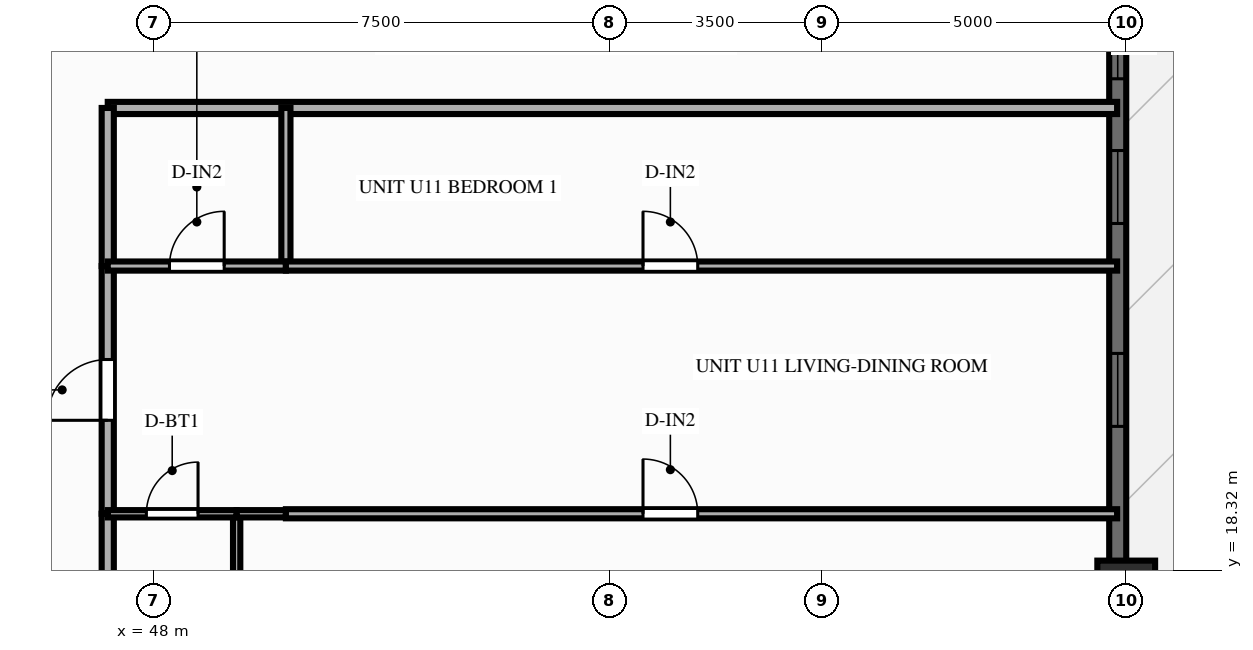
"""IFC4 building model, lengths in metres.
Left out: names, types, materials, properties, quantities, classifications, styles, units other than length and angle.
Written with IfcOpenShell. Run it as: python <this file> out.ifc"""

import sys

from ifc_helpers import new_model, si_unit, direction, frame, frame_2d, origin, origin_2d, place, context, subcontext, project, spatial, rectangle, extrude, source, transform, mapped, element, fill, save


model = new_model("IFC4")
c1 = context("Model", 3, precision=1e-05, world=origin(), true_north=direction((0.0, 1.0)))
c2 = subcontext(c1, "Body", "Model", "MODEL_VIEW")
j1 = project(units=[si_unit("LENGTHUNIT", "METRE"), si_unit("PLANEANGLEUNIT", "RADIAN")], contexts=[c1])
p1 = place(None, origin())
s1 = spatial("IfcSite", under=j1, at=p1, CompositionType="ELEMENT")
p2 = place(p1, origin())
s2 = spatial("IfcBuilding", under=s1, at=p2, CompositionType="ELEMENT")
p3 = place(p2, frame((0.0, 0.0, 104.85)))
s3 = spatial("IfcBuildingStorey", under=s2, at=p3, CompositionType="ELEMENT", Elevation=104.85)
m1 = source(origin(), c2, "Body", "SweptSolid", [
    extrude(rectangle(XDim=0.95, YDim=0.95, at=origin_2d()), origin(), (0.0, 0.0, 1.0), 3.0),
])
p4 = place(p3, frame((64.0, 18.0, 0.0), z_axis=(0.0, 0.0, 1.0), x_axis=(1.0, 0.0, 0.0)))
e1 = element("IfcColumn", 1, at=p4, inside=s3, PredefinedType="COLUMN", context=c2, shape_type="MappedRepresentation", body=[
    mapped(m1, transform((0.0, 0.0, 0.0), scale=1.0)),
])
p5 = place(p3, frame((63.86, 7.2, 0.0), z_axis=(0.0, 0.0, 1.0), x_axis=(0.0, 1.0, 0.0)))
e2 = element("IfcWall", 2, at=p5, inside=s3, PredefinedType="SOLIDWALL", context=c2, shape_type="SweptSolid", body=[
    extrude(rectangle(XDim=39.6, YDim=0.28, at=frame_2d((19.8, 0.0))), origin(), (0.0, 0.0, 1.0), 2.28),
])
p6 = place(p5, frame((0.945, 0.0, 0.25)))
e3 = element("IfcOpeningElement", 3, at=p6, cuts=e2, PredefinedType="OPENING", context=c2, shape_type="SweptSolid", body=[
    extrude(rectangle(XDim=1.2, YDim=1.5, at=frame_2d((0.6, 0.75))), frame((0.0, 0.152, 0.0), z_axis=(0.0, -1.0, 0.0), x_axis=(1.0, 0.0, 0.0)), (0.0, 0.0, 1.0), 0.304),
])
p7 = place(p5, frame((4.213, 0.0, 0.25)))
e4 = element("IfcOpeningElement", 4, at=p7, cuts=e2, PredefinedType="OPENING", context=c2, shape_type="SweptSolid", body=[
    extrude(rectangle(XDim=1.2, YDim=1.5, at=frame_2d((0.6, 0.75))), frame((0.0, 0.152, 0.0), z_axis=(0.0, -1.0, 0.0), x_axis=(1.0, 0.0, 0.0)), (0.0, 0.0, 1.0), 0.304),
])
p8 = place(p5, frame((7.55, 0.0, 0.25)))
e5 = element("IfcOpeningElement", 5, at=p8, cuts=e2, PredefinedType="OPENING", context=c2, shape_type="SweptSolid", body=[
    extrude(rectangle(XDim=1.2, YDim=1.5, at=frame_2d((0.6, 0.75))), frame((0.0, 0.152, 0.0), z_axis=(0.0, -1.0, 0.0), x_axis=(1.0, 0.0, 0.0)), (0.0, 0.0, 1.0), 0.304),
])
p9 = place(p5, frame((13.483, 0.0, 0.25)))
e6 = element("IfcOpeningElement", 6, at=p9, cuts=e2, PredefinedType="OPENING", context=c2, shape_type="SweptSolid", body=[
    extrude(rectangle(XDim=1.2, YDim=1.5, at=frame_2d((0.6, 0.75))), frame((0.0, 0.152, 0.0), z_axis=(0.0, -1.0, 0.0), x_axis=(1.0, 0.0, 0.0)), (0.0, 0.0, 1.0), 0.304),
])
p10 = place(p5, frame((16.82, 0.0, 0.25)))
e7 = element("IfcOpeningElement", 7, at=p10, cuts=e2, PredefinedType="OPENING", context=c2, shape_type="SweptSolid", body=[
    extrude(rectangle(XDim=1.2, YDim=1.5, at=frame_2d((0.6, 0.75))), frame((0.0, 0.152, 0.0), z_axis=(0.0, -1.0, 0.0), x_axis=(1.0, 0.0, 0.0)), (0.0, 0.0, 1.0), 0.304),
])
p11 = place(p5, frame((19.2, 0.0, 0.25)))
e8 = element("IfcOpeningElement", 8, at=p11, cuts=e2, PredefinedType="OPENING", context=c2, shape_type="SweptSolid", body=[
    extrude(rectangle(XDim=1.2, YDim=1.5, at=frame_2d((0.6, 0.75))), frame((0.0, 0.152, 0.0), z_axis=(0.0, -1.0, 0.0), x_axis=(1.0, 0.0, 0.0)), (0.0, 0.0, 1.0), 0.304),
])
p12 = place(p5, frame((21.578, 0.0, 0.25)))
e9 = element("IfcOpeningElement", 9, at=p12, cuts=e2, PredefinedType="OPENING", context=c2, shape_type="SweptSolid", body=[
    extrude(rectangle(XDim=1.2, YDim=1.5, at=frame_2d((0.6, 0.75))), frame((0.0, 0.152, 0.0), z_axis=(0.0, -1.0, 0.0), x_axis=(1.0, 0.0, 0.0)), (0.0, 0.0, 1.0), 0.304),
])
p13 = place(p5, frame((26.313, 0.0, 0.0), z_axis=(0.0, 0.0, 1.0), x_axis=(-1.0, 0.0, 0.0)))
e10 = element("IfcOpeningElement", 10, at=p13, cuts=e2, PredefinedType="OPENING", context=c2, shape_type="SweptSolid", body=[
    extrude(rectangle(XDim=1.6, YDim=2.15, at=frame_2d((0.8, 1.075))), frame((0.0, 0.152, 0.0), z_axis=(0.0, -1.0, 0.0), x_axis=(1.0, 0.0, 0.0)), (0.0, 0.0, 1.0), 0.304),
])
p14 = place(p5, frame((29.305, 0.0, 0.25)))
e11 = element("IfcOpeningElement", 11, at=p14, cuts=e2, PredefinedType="OPENING", context=c2, shape_type="SweptSolid", body=[
    extrude(rectangle(XDim=0.7, YDim=1.5, at=frame_2d((0.35, 0.75))), frame((0.0, 0.152, 0.0), z_axis=(0.0, -1.0, 0.0), x_axis=(1.0, 0.0, 0.0)), (0.0, 0.0, 1.0), 0.304),
])
p15 = place(p5, frame((30.848, 0.0, 0.25)))
e12 = element("IfcOpeningElement", 12, at=p15, cuts=e2, PredefinedType="OPENING", context=c2, shape_type="SweptSolid", body=[
    extrude(rectangle(XDim=1.2, YDim=1.5, at=frame_2d((0.6, 0.75))), frame((0.0, 0.152, 0.0), z_axis=(0.0, -1.0, 0.0), x_axis=(1.0, 0.0, 0.0)), (0.0, 0.0, 1.0), 0.304),
])
p16 = place(p5, frame((34.183, 0.0, 0.25)))
e13 = element("IfcOpeningElement", 13, at=p16, cuts=e2, PredefinedType="OPENING", context=c2, shape_type="SweptSolid", body=[
    extrude(rectangle(XDim=1.2, YDim=1.5, at=frame_2d((0.6, 0.75))), frame((0.0, 0.152, 0.0), z_axis=(0.0, -1.0, 0.0), x_axis=(1.0, 0.0, 0.0)), (0.0, 0.0, 1.0), 0.304),
])
p17 = place(p5, frame((37.452, 0.0, 0.25)))
e14 = element("IfcOpeningElement", 14, at=p17, cuts=e2, PredefinedType="OPENING", context=c2, shape_type="SweptSolid", body=[
    extrude(rectangle(XDim=1.2, YDim=1.5, at=frame_2d((0.6, 0.75))), frame((0.0, 0.152, 0.0), z_axis=(0.0, -1.0, 0.0), x_axis=(1.0, 0.0, 0.0)), (0.0, 0.0, 1.0), 0.304),
])
p18 = place(p3, frame((47.25, 25.92, 0.0), z_axis=(0.0, 0.0, 1.0), x_axis=(1.0, 0.0, 0.0)))
e15 = element("IfcWall", 15, at=p18, inside=s3, PredefinedType="PARTITIONING", context=c2, shape_type="SweptSolid", body=[
    extrude(rectangle(XDim=16.6, YDim=0.2, at=frame_2d((8.3, 0.0))), origin(), (0.0, 0.0, 1.0), 2.79),
])
p19 = place(p3, frame((47.25, 16.65, 0.0), z_axis=(0.0, 0.0, 1.0), x_axis=(0.0, 1.0, 0.0)))
e16 = element("IfcWall", 16, at=p19, inside=s3, PredefinedType="PARTITIONING", context=c2, shape_type="SweptSolid", body=[
    extrude(rectangle(XDim=2.596, YDim=0.2, at=frame_2d((1.298, 0.0))), origin(), (0.0, 0.0, 1.0), 2.79),
])
p20 = place(p3, frame((47.25, 19.246, 0.0), z_axis=(0.0, 0.0, 1.0), x_axis=(0.0, 1.0, 0.0)))
e17 = element("IfcWall", 17, at=p20, inside=s3, PredefinedType="PARTITIONING", context=c2, shape_type="SweptSolid", body=[
    extrude(rectangle(XDim=4.074, YDim=0.2, at=frame_2d((2.037, 0.0))), origin(), (0.0, 0.0, 1.0), 2.79),
])
p21 = place(p20, frame((1.537, 0.0, 0.0)))
e18 = element("IfcOpeningElement", 18, at=p21, cuts=e17, PredefinedType="OPENING", context=c2, shape_type="SweptSolid", body=[
    extrude(rectangle(XDim=1.0, YDim=2.15, at=frame_2d((0.5, 1.075))), frame((0.0, 0.112, 0.0), z_axis=(0.0, -1.0, 0.0), x_axis=(1.0, 0.0, 0.0)), (0.0, 0.0, 1.0), 0.224),
])
p22 = place(p3, frame((47.25, 23.32, 0.0), z_axis=(0.0, 0.0, 1.0), x_axis=(0.0, 1.0, 0.0)))
e19 = element("IfcWall", 19, at=p22, inside=s3, PredefinedType="PARTITIONING", context=c2, shape_type="SweptSolid", body=[
    extrude(rectangle(XDim=2.6, YDim=0.2, at=frame_2d((1.3, 0.0))), origin(), (0.0, 0.0, 1.0), 2.79),
])
p23 = place(p3, frame((49.37, 16.65, 0.0), z_axis=(0.0, 0.0, 1.0), x_axis=(0.0, 1.0, 0.0)))
e20 = element("IfcWall", 20, at=p23, inside=s3, PredefinedType="PARTITIONING", context=c2, shape_type="SweptSolid", body=[
    extrude(rectangle(XDim=2.596, YDim=0.12, at=frame_2d((1.298, 0.0))), origin(), (0.0, 0.0, 1.0), 2.79),
])
p24 = place(p3, frame((50.18, 23.32, 0.0), z_axis=(0.0, 0.0, 1.0), x_axis=(0.0, 1.0, 0.0)))
e21 = element("IfcWall", 21, at=p24, inside=s3, PredefinedType="PARTITIONING", context=c2, shape_type="SweptSolid", body=[
    extrude(rectangle(XDim=2.6, YDim=0.15, at=frame_2d((1.3, 0.0))), origin(), (0.0, 0.0, 1.0), 2.79),
])
p25 = place(p3, frame((47.25, 19.246, 0.0), z_axis=(0.0, 0.0, 1.0), x_axis=(1.0, 0.0, 0.0)))
e22 = element("IfcWall", 22, at=p25, inside=s3, PredefinedType="PARTITIONING", context=c2, shape_type="SweptSolid", body=[
    extrude(rectangle(XDim=2.12, YDim=0.12, at=frame_2d((1.06, 0.0))), origin(), (0.0, 0.0, 1.0), 2.79),
])
p26 = place(p25, frame((0.635, 0.0, 0.0)))
e23 = element("IfcOpeningElement", 23, at=p26, cuts=e22, PredefinedType="OPENING", context=c2, shape_type="SweptSolid", body=[
    extrude(rectangle(XDim=0.85, YDim=2.05, at=frame_2d((0.425, 1.025))), frame((0.0, 0.072, 0.0), z_axis=(0.0, -1.0, 0.0), x_axis=(1.0, 0.0, 0.0)), (0.0, 0.0, 1.0), 0.144),
])
p27 = place(p3, frame((49.37, 19.246, 0.0), z_axis=(0.0, 0.0, 1.0), x_axis=(1.0, 0.0, 0.0)))
e24 = element("IfcWall", 24, at=p27, inside=s3, PredefinedType="PARTITIONING", context=c2, shape_type="SweptSolid", body=[
    extrude(rectangle(XDim=0.81, YDim=0.12, at=frame_2d((0.405, 0.0))), origin(), (0.0, 0.0, 1.0), 2.79),
])
p28 = place(p3, frame((50.18, 19.246, 0.0), z_axis=(0.0, 0.0, 1.0), x_axis=(1.0, 0.0, 0.0)))
e25 = element("IfcWall", 25, at=p28, inside=s3, PredefinedType="PARTITIONING", context=c2, shape_type="SweptSolid", body=[
    extrude(rectangle(XDim=13.67, YDim=0.15, at=frame_2d((6.835, 0.0))), origin(), (0.0, 0.0, 1.0), 2.79),
])
p29 = place(p28, frame((5.873, 0.0, 0.0)))
e26 = element("IfcOpeningElement", 26, at=p29, cuts=e25, PredefinedType="OPENING", context=c2, shape_type="SweptSolid", body=[
    extrude(rectangle(XDim=0.9, YDim=2.1, at=frame_2d((0.45, 1.05))), frame((0.0, 0.087, 0.0), z_axis=(0.0, -1.0, 0.0), x_axis=(1.0, 0.0, 0.0)), (0.0, 0.0, 1.0), 0.174),
])
p30 = place(p3, frame((47.25, 23.32, 0.0), z_axis=(0.0, 0.0, 1.0), x_axis=(1.0, 0.0, 0.0)))
e27 = element("IfcWall", 27, at=p30, inside=s3, PredefinedType="PARTITIONING", context=c2, shape_type="SweptSolid", body=[
    extrude(rectangle(XDim=2.93, YDim=0.15, at=frame_2d((1.465, 0.0))), origin(), (0.0, 0.0, 1.0), 2.79),
])
p31 = place(p30, frame((1.015, 0.0, 0.0)))
e28 = element("IfcOpeningElement", 28, at=p31, cuts=e27, PredefinedType="OPENING", context=c2, shape_type="SweptSolid", body=[
    extrude(rectangle(XDim=0.9, YDim=2.1, at=frame_2d((0.45, 1.05))), frame((0.0, 0.087, 0.0), z_axis=(0.0, -1.0, 0.0), x_axis=(1.0, 0.0, 0.0)), (0.0, 0.0, 1.0), 0.174),
])
p32 = place(p3, frame((50.18, 23.32, 0.0), z_axis=(0.0, 0.0, 1.0), x_axis=(1.0, 0.0, 0.0)))
e29 = element("IfcWall", 29, at=p32, inside=s3, PredefinedType="PARTITIONING", context=c2, shape_type="SweptSolid", body=[
    extrude(rectangle(XDim=13.67, YDim=0.15, at=frame_2d((6.835, 0.0))), origin(), (0.0, 0.0, 1.0), 2.79),
])
p33 = place(p32, frame((5.873, 0.0, 0.0)))
e30 = element("IfcOpeningElement", 30, at=p33, cuts=e29, PredefinedType="OPENING", context=c2, shape_type="SweptSolid", body=[
    extrude(rectangle(XDim=0.9, YDim=2.1, at=frame_2d((0.45, 1.05))), frame((0.0, 0.087, 0.0), z_axis=(0.0, -1.0, 0.0), x_axis=(1.0, 0.0, 0.0)), (0.0, 0.0, 1.0), 0.174),
])
m2 = source(origin(), c2, "Body", "SweptSolid", [
    extrude(rectangle(XDim=1.2, YDim=1.5, at=frame_2d((0.6, 0.75))), frame((0.0, 0.03, 0.0), z_axis=(0.0, -1.0, 0.0), x_axis=(1.0, 0.0, 0.0)), (0.0, 0.0, 1.0), 0.06),
])
p34 = place(p9, origin())
e31 = element("IfcWindow", 31, at=p34, inside=s3, PartitioningType="SINGLE_PANEL", PredefinedType="WINDOW", context=c2, shape_type="MappedRepresentation", body=[
    mapped(m2, transform((0.0, 0.0, 0.0), scale=1.0)),
])
fill(e6, e31)
p35 = place(p10, origin())
e32 = element("IfcWindow", 32, at=p35, inside=s3, PartitioningType="SINGLE_PANEL", PredefinedType="WINDOW", context=c2, shape_type="MappedRepresentation", body=[
    mapped(m2, transform((0.0, 0.0, 0.0), scale=1.0)),
])
fill(e7, e32)
p36 = place(p11, origin())
e33 = element("IfcWindow", 33, at=p36, inside=s3, PartitioningType="SINGLE_PANEL", PredefinedType="WINDOW", context=c2, shape_type="MappedRepresentation", body=[
    mapped(m2, transform((0.0, 0.0, 0.0), scale=1.0)),
])
fill(e8, e33)
m3 = source(origin(), c2, "Body", "SweptSolid", [
    extrude(rectangle(XDim=1.0, YDim=2.15, at=frame_2d((0.5, 1.075))), frame((0.0, 0.025, 0.0), z_axis=(0.0, -1.0, 0.0), x_axis=(1.0, 0.0, 0.0)), (0.0, 0.0, 1.0), 0.05),
])
p37 = place(p21, origin())
e34 = element("IfcDoor", 34, at=p37, inside=s3, OperationType="SINGLE_SWING_LEFT", PredefinedType="DOOR", context=c2, shape_type="MappedRepresentation", body=[
    mapped(m3, transform((0.0, 0.0, 0.0), scale=1.0)),
])
fill(e18, e34)
m4 = source(origin(), c2, "Body", "SweptSolid", [
    extrude(rectangle(XDim=0.85, YDim=2.05, at=frame_2d((0.425, 1.025))), frame((0.0, 0.025, 0.0), z_axis=(0.0, -1.0, 0.0), x_axis=(1.0, 0.0, 0.0)), (0.0, 0.0, 1.0), 0.05),
])
p38 = place(p26, origin())
e35 = element("IfcDoor", 35, at=p38, inside=s3, OperationType="SINGLE_SWING_RIGHT", PredefinedType="DOOR", context=c2, shape_type="MappedRepresentation", body=[
    mapped(m4, transform((0.0, 0.0, 0.0), scale=1.0)),
])
fill(e23, e35)
m5 = source(origin(), c2, "Body", "SweptSolid", [
    extrude(rectangle(XDim=0.9, YDim=2.1, at=frame_2d((0.45, 1.05))), frame((0.0, 0.025, 0.0), z_axis=(0.0, -1.0, 0.0), x_axis=(1.0, 0.0, 0.0)), (0.0, 0.0, 1.0), 0.05),
])
p39 = place(p29, origin())
e36 = element("IfcDoor", 36, at=p39, inside=s3, OperationType="SINGLE_SWING_LEFT", PredefinedType="DOOR", context=c2, shape_type="MappedRepresentation", body=[
    mapped(m5, transform((0.0, 0.0, 0.0), scale=1.0)),
])
fill(e26, e36)
p40 = place(p31, origin())
e37 = element("IfcDoor", 37, at=p40, inside=s3, OperationType="SINGLE_SWING_RIGHT", PredefinedType="DOOR", context=c2, shape_type="MappedRepresentation", body=[
    mapped(m5, transform((0.0, 0.0, 0.0), scale=1.0)),
])
fill(e28, e37)
p41 = place(p33, origin())
e38 = element("IfcDoor", 38, at=p41, inside=s3, OperationType="SINGLE_SWING_LEFT", PredefinedType="DOOR", context=c2, shape_type="MappedRepresentation", body=[
    mapped(m5, transform((0.0, 0.0, 0.0), scale=1.0)),
])
fill(e30, e38)
save(model, sys.argv[1])
